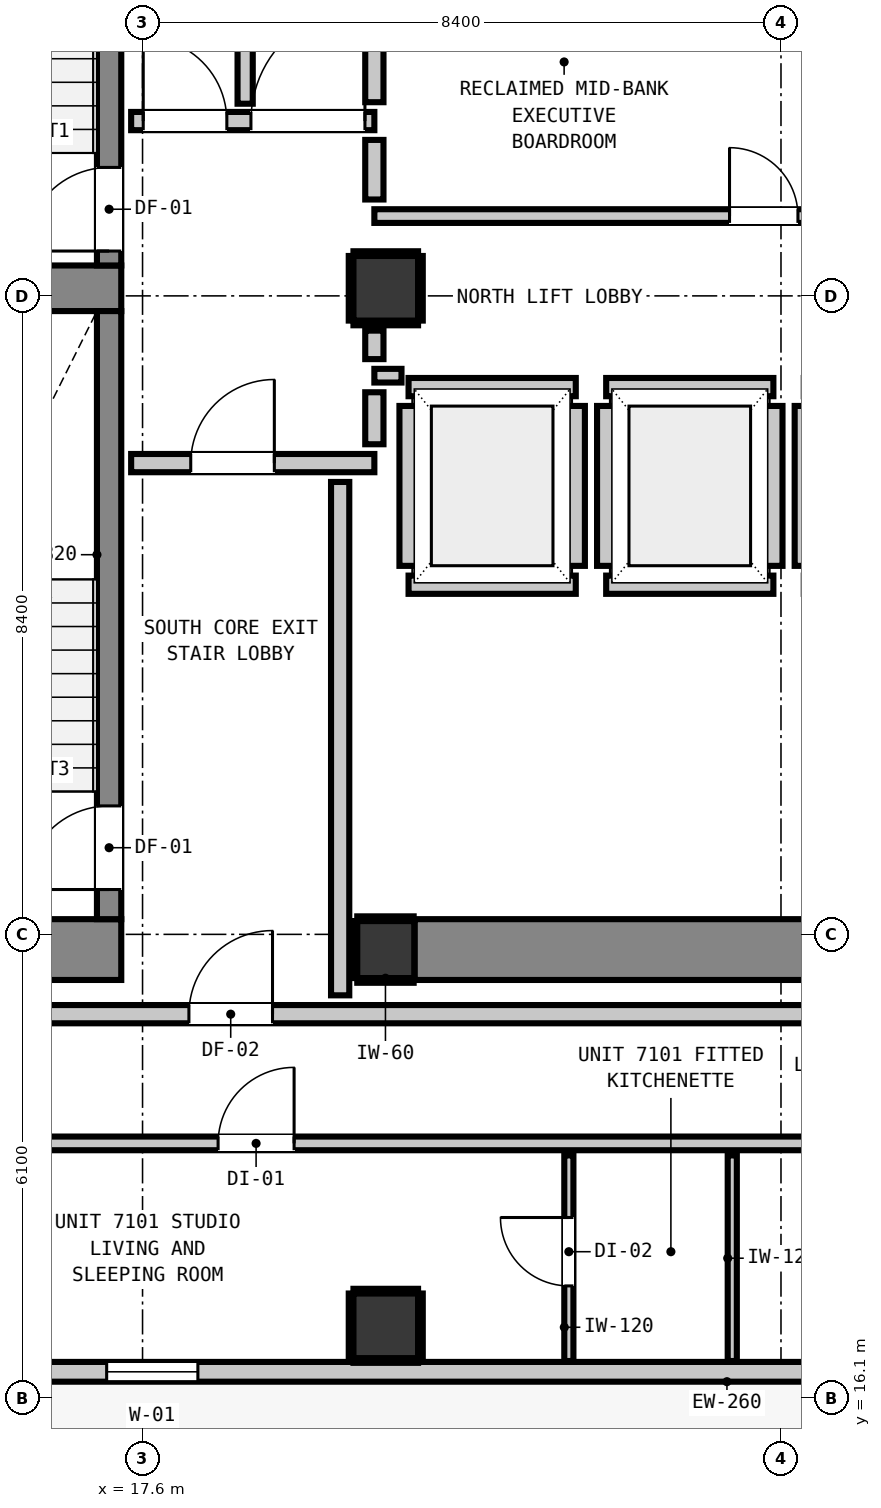
"""IFC4 building model, lengths in metres.
Left out: names, types, materials, properties, quantities, classifications, styles, units other than length and angle.
Written with IfcOpenShell. Run it as: python <this file> out.ifc"""

import sys

from ifc_helpers import new_model, si_unit, direction, frame, frame_2d, origin, origin_2d, place, context, subcontext, project, spatial, rectangle, extrude, element, fill, save


model = new_model("IFC4")
c1 = context("Model", 3, precision=1e-05, world=origin(), true_north=direction((0.0, 1.0)))
c2 = subcontext(c1, "Body", "Model", "MODEL_VIEW")
j1 = project(units=[si_unit("LENGTHUNIT", "METRE"), si_unit("PLANEANGLEUNIT", "RADIAN")], contexts=[c1])
p1 = place(None, origin())
s1 = spatial("IfcSite", under=j1, at=p1, CompositionType="ELEMENT")
p2 = place(p1, origin())
s2 = spatial("IfcBuilding", under=s1, at=p2, CompositionType="ELEMENT")
p3 = place(p2, frame((0.0, 0.0, 244.56)))
s3 = spatial("IfcBuildingStorey", under=s2, at=p3, CompositionType="ELEMENT", Elevation=244.56)
p4 = place(p3, frame((20.8, 22.0, 0.0), z_axis=(0.0, 0.0, 1.0), x_axis=(1.0, 0.0, 0.0)))
e1 = element("IfcColumn", 1, at=p4, inside=s3, PredefinedType="COLUMN", context=c2, shape_type="SweptSolid", body=[
    extrude(rectangle(XDim=0.75, YDim=0.75, at=origin_2d()), origin(), (0.0, 0.0, 1.0), 3.32),
])
p5 = place(p3, frame((13.24, 22.0, 0.0), z_axis=(0.0, 0.0, 1.0), x_axis=(1.0, 0.0, 0.0)))
e2 = element("IfcWall", 2, at=p5, inside=s3, PredefinedType="SHEAR", context=c2, shape_type="SweptSolid", body=[
    extrude(rectangle(XDim=4.08, YDim=0.8, at=frame_2d((2.04, 0.0))), origin(), (0.0, 0.0, 1.0), 3.32),
])
p6 = place(p3, frame((13.78, 30.7, 0.0), z_axis=(0.0, 0.0, 1.0), x_axis=(1.0, 0.0, 0.0)))
e3 = element("IfcWall", 3, at=p6, inside=s3, PredefinedType="SHEAR", context=c2, shape_type="SweptSolid", body=[
    extrude(rectangle(XDim=3.54, YDim=0.6, at=frame_2d((1.77, 0.0))), origin(), (0.0, 0.0, 1.0), 3.32),
])
p7 = place(p3, frame((21.18, 22.0, 0.0), z_axis=(0.0, 0.0, 1.0), x_axis=(1.0, 0.0, 0.0)))
e4 = element("IfcWall", 4, at=p7, inside=s3, PredefinedType="SHEAR", context=c2, shape_type="SweptSolid", body=[
    extrude(rectangle(XDim=7.64, YDim=0.8, at=frame_2d((3.82, 0.0))), origin(), (0.0, 0.0, 1.0), 3.32),
])
p8 = place(p3, frame((17.16, 31.0, 0.0), z_axis=(0.0, 0.0, 1.0), x_axis=(0.0, 1.0, 0.0)))
e5 = element("IfcWall", 5, at=p8, inside=s3, PredefinedType="SHEAR", context=c2, shape_type="SweptSolid", body=[
    extrude(rectangle(XDim=7.8, YDim=0.32, at=frame_2d((3.9, 0.0))), origin(), (0.0, 0.0, 1.0), 3.32),
])
p9 = place(p8, frame((0.19, 0.0, 0.0)))
e6 = element("IfcOpeningElement", 6, at=p9, cuts=e5, PredefinedType="OPENING", context=c2, shape_type="SweptSolid", body=[
    extrude(rectangle(XDim=1.1, YDim=2.15, at=frame_2d((0.55, 1.075))), frame((0.0, 0.17, 0.0), z_axis=(0.0, -1.0, 0.0), x_axis=(1.0, 0.0, 0.0)), (0.0, 0.0, 1.0), 0.34),
])
p10 = place(p3, frame((17.16, 22.4, 0.0), z_axis=(0.0, 0.0, 1.0), x_axis=(0.0, 1.0, 0.0)))
e7 = element("IfcWall", 7, at=p10, inside=s3, PredefinedType="SHEAR", context=c2, shape_type="SweptSolid", body=[
    extrude(rectangle(XDim=8.0, YDim=0.32, at=frame_2d((4.0, 0.0))), origin(), (0.0, 0.0, 1.0), 3.32),
])
p11 = place(p10, frame((0.39, 0.0, 0.0)))
e8 = element("IfcOpeningElement", 8, at=p11, cuts=e7, PredefinedType="OPENING", context=c2, shape_type="SweptSolid", body=[
    extrude(rectangle(XDim=1.1, YDim=2.15, at=frame_2d((0.55, 1.075))), frame((0.0, 0.17, 0.0), z_axis=(0.0, -1.0, 0.0), x_axis=(1.0, 0.0, 0.0)), (0.0, 0.0, 1.0), 0.34),
])
for number, where, z_axis, x_axis in (
    (9, (20.8, 30.7, 0.0), (0.0, 0.0, 1.0), (1.0, 0.0, 0.0)),
    (10, (20.8, 17.05, 0.0), (0.0, 0.0, 1.0), (1.0, 0.0, 0.0)),
):
    element("IfcColumn", number, at=place(p3, frame(where, z_axis=z_axis, x_axis=x_axis)), inside=s3, PredefinedType="COLUMN", context=c2, shape_type="SweptSolid", body=[
        extrude(rectangle(XDim=0.85, YDim=0.85, at=origin_2d()), origin(), (0.0, 0.0, 1.0), 3.32),
    ])
p12 = place(p3, frame((45.455, 16.445, 0.0), z_axis=(0.0, 0.0, 1.0), x_axis=(-1.0, 0.0, 0.0)))
e11 = element("IfcWall", 11, at=p12, inside=s3, PredefinedType="STANDARD", context=c2, shape_type="SweptSolid", body=[
    extrude(rectangle(XDim=32.71, YDim=0.26, at=frame_2d((16.355, 0.0))), origin(), (0.0, 0.0, 1.0), 3.1),
])
p13 = place(p12, frame((0.907, 0.0, 0.0)))
e12 = element("IfcOpeningElement", 12, at=p13, cuts=e11, PredefinedType="OPENING", context=c2, shape_type="SweptSolid", body=[
    extrude(rectangle(XDim=1.0, YDim=2.15, at=frame_2d((0.5, 1.075))), frame((0.0, 0.14, 0.0), z_axis=(0.0, -1.0, 0.0), x_axis=(1.0, 0.0, 0.0)), (0.0, 0.0, 1.0), 0.28),
])
p14 = place(p12, frame((27.127, 0.0, 0.85)))
e13 = element("IfcOpeningElement", 13, at=p14, cuts=e11, PredefinedType="OPENING", context=c2, shape_type="SweptSolid", body=[
    extrude(rectangle(XDim=1.2, YDim=1.8, at=frame_2d((0.6, 0.9))), frame((0.0, 0.14, 0.0), z_axis=(0.0, -1.0, 0.0), x_axis=(1.0, 0.0, 0.0)), (0.0, 0.0, 1.0), 0.28),
])
p15 = place(p12, frame((12.005, 0.0, 0.85)))
e14 = element("IfcOpeningElement", 14, at=p15, cuts=e11, PredefinedType="OPENING", context=c2, shape_type="SweptSolid", body=[
    extrude(rectangle(XDim=1.2, YDim=1.8, at=frame_2d((0.6, 0.9))), frame((0.0, 0.14, 0.0), z_axis=(0.0, -1.0, 0.0), x_axis=(1.0, 0.0, 0.0)), (0.0, 0.0, 1.0), 0.28),
])
for number, where, z_axis, x_axis in (
    (15, (21.1, 26.8, 0.0), (0.0, 0.0, 1.0), (1.0, 0.0, 0.0)),
    (16, (21.1, 29.4, 0.0), (0.0, 0.0, 1.0), (1.0, 0.0, 0.0)),
):
    element("IfcWall", number, at=place(p3, frame(where, z_axis=z_axis, x_axis=x_axis)), inside=s3, PredefinedType="PARTITIONING", context=c2, shape_type="SweptSolid", body=[
        extrude(rectangle(XDim=2.2, YDim=0.24, at=frame_2d((1.1, 0.0))), origin(), (0.0, 0.0, 1.0), 3.1),
    ])
p16 = place(p3, frame((21.1, 27.048, 0.0), z_axis=(0.0, 0.0, 1.0), x_axis=(0.0, 1.0, 0.0)))
e17 = element("IfcWall", 17, at=p16, inside=s3, PredefinedType="PARTITIONING", context=c2, shape_type="SweptSolid", body=[
    extrude(rectangle(XDim=2.104, YDim=0.24, at=frame_2d((1.052, 0.0))), origin(), (0.0, 0.0, 1.0), 2.335),
])
p17 = place(p3, frame((23.3, 27.048, 0.0), z_axis=(0.0, 0.0, 1.0), x_axis=(0.0, 1.0, 0.0)))
e18 = element("IfcWall", 18, at=p17, inside=s3, PredefinedType="PARTITIONING", context=c2, shape_type="SweptSolid", body=[
    extrude(rectangle(XDim=2.104, YDim=0.24, at=frame_2d((1.052, 0.0))), origin(), (0.0, 0.0, 1.0), 3.1),
])
for number, where, z_axis, x_axis in (
    (19, (23.7, 26.8, 0.0), (0.0, 0.0, 1.0), (1.0, 0.0, 0.0)),
    (20, (23.7, 29.4, 0.0), (0.0, 0.0, 1.0), (1.0, 0.0, 0.0)),
):
    element("IfcWall", number, at=place(p3, frame(where, z_axis=z_axis, x_axis=x_axis)), inside=s3, PredefinedType="PARTITIONING", context=c2, shape_type="SweptSolid", body=[
        extrude(rectangle(XDim=2.2, YDim=0.24, at=frame_2d((1.1, 0.0))), origin(), (0.0, 0.0, 1.0), 3.1),
    ])
for number, where, z_axis, x_axis in (
    (21, (23.7, 27.048, 0.0), (0.0, 0.0, 1.0), (0.0, 1.0, 0.0)),
    (22, (25.9, 27.048, 0.0), (0.0, 0.0, 1.0), (0.0, 1.0, 0.0)),
    (23, (26.3, 27.048, 0.0), (0.0, 0.0, 1.0), (0.0, 1.0, 0.0)),
):
    element("IfcWall", number, at=place(p3, frame(where, z_axis=z_axis, x_axis=x_axis)), inside=s3, PredefinedType="PARTITIONING", context=c2, shape_type="SweptSolid", body=[
        extrude(rectangle(XDim=2.104, YDim=0.24, at=frame_2d((1.052, 0.0))), origin(), (0.0, 0.0, 1.0), 3.1),
    ])
p18 = place(p3, frame((10.787, 21.15, 0.0), z_axis=(0.0, 0.0, 1.0), x_axis=(1.0, 0.0, 0.0)))
e24 = element("IfcWall", 24, at=p18, inside=s3, PredefinedType="PARTITIONING", context=c2, shape_type="SweptSolid", body=[
    extrude(rectangle(XDim=26.102, YDim=0.24, at=frame_2d((13.051, 0.0))), origin(), (0.0, 0.0, 1.0), 3.1),
])
p19 = place(p18, frame((7.423, 0.0, 0.0)))
e25 = element("IfcOpeningElement", 25, at=p19, cuts=e24, PredefinedType="OPENING", context=c2, shape_type="SweptSolid", body=[
    extrude(rectangle(XDim=1.1, YDim=2.15, at=frame_2d((0.55, 1.075))), frame((0.0, 0.13, 0.0), z_axis=(0.0, -1.0, 0.0), x_axis=(1.0, 0.0, 0.0)), (0.0, 0.0, 1.0), 0.26),
])
p20 = place(p3, frame((17.45, 28.4, 0.0), z_axis=(0.0, 0.0, 1.0), x_axis=(1.0, 0.0, 0.0)))
e26 = element("IfcWall", 26, at=p20, inside=s3, PredefinedType="PARTITIONING", context=c2, shape_type="SweptSolid", body=[
    extrude(rectangle(XDim=3.2, YDim=0.24, at=frame_2d((1.6, 0.0))), origin(), (0.0, 0.0, 1.0), 3.1),
])
p21 = place(p20, frame((0.784, 0.0, 0.0)))
e27 = element("IfcOpeningElement", 27, at=p21, cuts=e26, PredefinedType="OPENING", context=c2, shape_type="SweptSolid", body=[
    extrude(rectangle(XDim=1.1, YDim=2.15, at=frame_2d((0.55, 1.075))), frame((0.0, 0.13, 0.0), z_axis=(0.0, -1.0, 0.0), x_axis=(1.0, 0.0, 0.0)), (0.0, 0.0, 1.0), 0.26),
])
p22 = place(p3, frame((17.45, 32.9, 0.0), z_axis=(0.0, 0.0, 1.0), x_axis=(1.0, 0.0, 0.0)))
e28 = element("IfcWall", 28, at=p22, inside=s3, PredefinedType="PARTITIONING", context=c2, shape_type="SweptSolid", body=[
    extrude(rectangle(XDim=3.2, YDim=0.24, at=frame_2d((1.6, 0.0))), origin(), (0.0, 0.0, 1.0), 3.1),
])
p23 = place(p22, frame((0.159, 0.0, 0.0)))
e29 = element("IfcOpeningElement", 29, at=p23, cuts=e28, PredefinedType="OPENING", context=c2, shape_type="SweptSolid", body=[
    extrude(rectangle(XDim=1.1, YDim=2.15, at=frame_2d((0.55, 1.075))), frame((0.0, 0.13, 0.0), z_axis=(0.0, -1.0, 0.0), x_axis=(1.0, 0.0, 0.0)), (0.0, 0.0, 1.0), 0.26),
])
p24 = place(p22, frame((1.576, 0.0, 0.0)))
e30 = element("IfcOpeningElement", 30, at=p24, cuts=e28, PredefinedType="OPENING", context=c2, shape_type="SweptSolid", body=[
    extrude(rectangle(XDim=1.5, YDim=2.15, at=frame_2d((0.75, 1.075))), frame((0.0, 0.13, 0.0), z_axis=(0.0, -1.0, 0.0), x_axis=(1.0, 0.0, 0.0)), (0.0, 0.0, 1.0), 0.26),
])
p25 = place(p3, frame((10.787, 19.45, 0.0), z_axis=(0.0, 0.0, 1.0), x_axis=(1.0, 0.0, 0.0)))
e31 = element("IfcWall", 31, at=p25, inside=s3, PredefinedType="PARTITIONING", context=c2, shape_type="SweptSolid", body=[
    extrude(rectangle(XDim=26.102, YDim=0.18, at=frame_2d((13.051, 0.0))), origin(), (0.0, 0.0, 1.0), 3.1),
])
p26 = place(p25, frame((7.807, 0.0, 0.0)))
e32 = element("IfcOpeningElement", 32, at=p26, cuts=e31, PredefinedType="OPENING", context=c2, shape_type="SweptSolid", body=[
    extrude(rectangle(XDim=1.0, YDim=2.15, at=frame_2d((0.5, 1.075))), frame((0.0, 0.1, 0.0), z_axis=(0.0, -1.0, 0.0), x_axis=(1.0, 0.0, 0.0)), (0.0, 0.0, 1.0), 0.2),
])
p27 = place(p25, frame((25.092, 0.0, 0.0)))
e33 = element("IfcOpeningElement", 33, at=p27, cuts=e31, PredefinedType="OPENING", context=c2, shape_type="SweptSolid", body=[
    extrude(rectangle(XDim=0.9, YDim=2.1, at=frame_2d((0.45, 1.05))), frame((0.0, 0.1, 0.0), z_axis=(0.0, -1.0, 0.0), x_axis=(1.0, 0.0, 0.0)), (0.0, 0.0, 1.0), 0.2),
])
p28 = place(p3, frame((20.65, 29.55, 0.0), z_axis=(0.0, 0.0, 1.0), x_axis=(1.0, 0.0, 0.0)))
e34 = element("IfcWall", 34, at=p28, inside=s3, PredefinedType="PARTITIONING", context=c2, shape_type="SweptSolid", body=[
    extrude(rectangle(XDim=0.357, YDim=0.18, at=frame_2d((0.179, 0.0))), origin(), (0.0, 0.0, 1.0), 3.1),
])
p29 = place(p3, frame((20.65, 31.65, 0.0), z_axis=(0.0, 0.0, 1.0), x_axis=(1.0, 0.0, 0.0)))
e35 = element("IfcWall", 35, at=p29, inside=s3, PredefinedType="PARTITIONING", context=c2, shape_type="SweptSolid", body=[
    extrude(rectangle(XDim=7.7, YDim=0.18, at=frame_2d((3.85, 0.0))), origin(), (0.0, 0.0, 1.0), 3.1),
])
p30 = place(p29, frame((4.673, 0.0, 0.0)))
e36 = element("IfcOpeningElement", 36, at=p30, cuts=e35, PredefinedType="OPENING", context=c2, shape_type="SweptSolid", body=[
    extrude(rectangle(XDim=0.9, YDim=2.1, at=frame_2d((0.45, 1.05))), frame((0.0, 0.1, 0.0), z_axis=(0.0, -1.0, 0.0), x_axis=(1.0, 0.0, 0.0)), (0.0, 0.0, 1.0), 0.2),
])
p31 = place(p3, frame((20.2, 21.398, 0.0), z_axis=(0.0, 0.0, 1.0), x_axis=(0.0, 1.0, 0.0)))
e37 = element("IfcWall", 37, at=p31, inside=s3, PredefinedType="PARTITIONING", context=c2, shape_type="SweptSolid", body=[
    extrude(rectangle(XDim=6.754, YDim=0.24, at=frame_2d((3.377, 0.0))), origin(), (0.0, 0.0, 1.0), 3.1),
])
p32 = place(p3, frame((20.65, 28.648, 0.0), z_axis=(0.0, 0.0, 1.0), x_axis=(0.0, 1.0, 0.0)))
e38 = element("IfcWall", 38, at=p32, inside=s3, PredefinedType="PARTITIONING", context=c2, shape_type="SweptSolid", body=[
    extrude(rectangle(XDim=0.684, YDim=0.24, at=frame_2d((0.342, 0.0))), origin(), (0.0, 0.0, 1.0), 2.335),
])
p33 = place(p3, frame((20.65, 29.768, 0.0), z_axis=(0.0, 0.0, 1.0), x_axis=(0.0, 1.0, 0.0)))
e39 = element("IfcWall", 39, at=p33, inside=s3, PredefinedType="PARTITIONING", context=c2, shape_type="SweptSolid", body=[
    extrude(rectangle(XDim=0.375, YDim=0.24, at=frame_2d((0.188, 0.0))), origin(), (0.0, 0.0, 1.0), 2.335),
])
p34 = place(p3, frame((20.65, 31.868, 0.0), z_axis=(0.0, 0.0, 1.0), x_axis=(0.0, 1.0, 0.0)))
e40 = element("IfcWall", 40, at=p34, inside=s3, PredefinedType="PARTITIONING", context=c2, shape_type="SweptSolid", body=[
    extrude(rectangle(XDim=0.784, YDim=0.24, at=frame_2d((0.392, 0.0))), origin(), (0.0, 0.0, 1.0), 2.335),
])
p35 = place(p3, frame((20.65, 33.148, 0.0), z_axis=(0.0, 0.0, 1.0), x_axis=(0.0, 1.0, 0.0)))
e41 = element("IfcWall", 41, at=p35, inside=s3, PredefinedType="PARTITIONING", context=c2, shape_type="SweptSolid", body=[
    extrude(rectangle(XDim=2.274, YDim=0.24, at=frame_2d((1.137, 0.0))), origin(), (0.0, 0.0, 1.0), 2.335),
])
p36 = place(p3, frame((18.95, 33.128, 0.0), z_axis=(0.0, 0.0, 1.0), x_axis=(0.0, 1.0, 0.0)))
e42 = element("IfcWall", 42, at=p36, inside=s3, PredefinedType="PARTITIONING", context=c2, shape_type="SweptSolid", body=[
    extrude(rectangle(XDim=2.314, YDim=0.2, at=frame_2d((1.157, 0.0))), origin(), (0.0, 0.0, 1.0), 3.1),
])
p37 = place(p3, frame((23.209, 16.587, 0.0), z_axis=(0.0, 0.0, 1.0), x_axis=(0.0, 1.0, 0.0)))
e43 = element("IfcWall", 43, at=p37, inside=s3, PredefinedType="PARTITIONING", context=c2, shape_type="SweptSolid", body=[
    extrude(rectangle(XDim=2.705, YDim=0.12, at=frame_2d((1.353, 0.0))), origin(), (0.0, 0.0, 1.0), 3.1),
])
p38 = place(p37, frame((0.988, 0.0, 0.0)))
e44 = element("IfcOpeningElement", 44, at=p38, cuts=e43, PredefinedType="OPENING", context=c2, shape_type="SweptSolid", body=[
    extrude(rectangle(XDim=0.9, YDim=2.1, at=frame_2d((0.45, 1.05))), frame((0.0, 0.07, 0.0), z_axis=(0.0, -1.0, 0.0), x_axis=(1.0, 0.0, 0.0)), (0.0, 0.0, 1.0), 0.14),
])
p39 = place(p3, frame((25.359, 16.587, 0.0), z_axis=(0.0, 0.0, 1.0), x_axis=(0.0, 1.0, 0.0)))
e45 = element("IfcWall", 45, at=p39, inside=s3, PredefinedType="PARTITIONING", context=c2, shape_type="SweptSolid", body=[
    extrude(rectangle(XDim=2.705, YDim=0.12, at=frame_2d((1.353, 0.0))), origin(), (0.0, 0.0, 1.0), 3.1),
])
for number, where, z_axis, x_axis in (
    (46, (20.425, 21.593, 0.0), (0.0, 0.0, 1.0), (1.0, 0.0, 0.0)),
    (47, (20.425, 22.407, 0.0), (0.0, 0.0, 1.0), (1.0, 0.0, 0.0)),
):
    element("IfcWall", number, at=place(p3, frame(where, z_axis=z_axis, x_axis=x_axis)), inside=s3, PredefinedType="PARTITIONING", context=c2, shape_type="SweptSolid", body=[
        extrude(rectangle(XDim=0.742, YDim=0.06, at=frame_2d((0.371, 0.0))), origin(), (0.0, 0.0, 1.0), 1.45),
    ])
p40 = place(p3, frame((20.393, 21.625, 0.0), z_axis=(0.0, 0.0, 1.0), x_axis=(0.0, 1.0, 0.0)))
e48 = element("IfcWall", 48, at=p40, inside=s3, PredefinedType="PARTITIONING", context=c2, shape_type="SweptSolid", body=[
    extrude(rectangle(XDim=0.75, YDim=0.06, at=frame_2d((0.375, 0.0))), origin(), (0.0, 0.0, 1.0), 1.45),
])
for number, where, z_axis, x_axis in (
    (49, (20.375, 30.243, 0.0), (0.0, 0.0, 1.0), (1.0, 0.0, 0.0)),
    (50, (20.375, 31.157, 0.0), (0.0, 0.0, 1.0), (1.0, 0.0, 0.0)),
    (51, (20.343, 30.275, 0.0), (0.0, 0.0, 1.0), (0.0, 1.0, 0.0)),
    (52, (21.257, 30.275, 0.0), (0.0, 0.0, 1.0), (0.0, 1.0, 0.0)),
    (53, (20.375, 16.593, 0.0), (0.0, 0.0, 1.0), (1.0, 0.0, 0.0)),
    (54, (20.375, 17.507, 0.0), (0.0, 0.0, 1.0), (1.0, 0.0, 0.0)),
    (55, (20.343, 16.625, 0.0), (0.0, 0.0, 1.0), (0.0, 1.0, 0.0)),
    (56, (21.257, 16.625, 0.0), (0.0, 0.0, 1.0), (0.0, 1.0, 0.0)),
):
    element("IfcWall", number, at=place(p3, frame(where, z_axis=z_axis, x_axis=x_axis)), inside=s3, PredefinedType="PARTITIONING", context=c2, shape_type="SweptSolid", body=[
        extrude(rectangle(XDim=0.85, YDim=0.06, at=frame_2d((0.425, 0.0))), origin(), (0.0, 0.0, 1.0), 1.45),
    ])
p41 = place(p14, origin())
e57 = element("IfcWindow", 57, at=p41, inside=s3, PartitioningType="SINGLE_PANEL", PredefinedType="WINDOW", context=c2, shape_type="SweptSolid", body=[
    extrude(rectangle(XDim=1.2, YDim=1.8, at=frame_2d((0.6, 0.9))), frame((0.0, 0.03, 0.0), z_axis=(0.0, -1.0, 0.0), x_axis=(1.0, 0.0, 0.0)), (0.0, 0.0, 1.0), 0.06),
])
fill(e13, e57)
p42 = place(p9, origin())
e58 = element("IfcDoor", 58, at=p42, inside=s3, OperationType="SINGLE_SWING_LEFT", PredefinedType="DOOR", context=c2, shape_type="SweptSolid", body=[
    extrude(rectangle(XDim=1.1, YDim=2.15, at=frame_2d((0.55, 1.075))), frame((0.0, 0.025, 0.0), z_axis=(0.0, -1.0, 0.0), x_axis=(1.0, 0.0, 0.0)), (0.0, 0.0, 1.0), 0.05),
])
fill(e6, e58)
p43 = place(p11, origin())
e59 = element("IfcDoor", 59, at=p43, inside=s3, OperationType="SINGLE_SWING_LEFT", PredefinedType="DOOR", context=c2, shape_type="SweptSolid", body=[
    extrude(rectangle(XDim=1.1, YDim=2.15, at=frame_2d((0.55, 1.075))), frame((0.0, 0.025, 0.0), z_axis=(0.0, -1.0, 0.0), x_axis=(1.0, 0.0, 0.0)), (0.0, 0.0, 1.0), 0.05),
])
fill(e8, e59)
p44 = place(p21, origin())
e60 = element("IfcDoor", 60, at=p44, inside=s3, OperationType="SINGLE_SWING_RIGHT", PredefinedType="DOOR", context=c2, shape_type="SweptSolid", body=[
    extrude(rectangle(XDim=1.1, YDim=2.15, at=frame_2d((0.55, 1.075))), frame((0.0, 0.025, 0.0), z_axis=(0.0, -1.0, 0.0), x_axis=(1.0, 0.0, 0.0)), (0.0, 0.0, 1.0), 0.05),
])
fill(e27, e60)
p45 = place(p23, origin())
e61 = element("IfcDoor", 61, at=p45, inside=s3, OperationType="SINGLE_SWING_LEFT", PredefinedType="DOOR", context=c2, shape_type="SweptSolid", body=[
    extrude(rectangle(XDim=1.1, YDim=2.15, at=frame_2d((0.55, 1.075))), frame((0.0, 0.025, 0.0), z_axis=(0.0, -1.0, 0.0), x_axis=(1.0, 0.0, 0.0)), (0.0, 0.0, 1.0), 0.05),
])
fill(e29, e61)
p46 = place(p19, origin())
e62 = element("IfcDoor", 62, at=p46, inside=s3, OperationType="SINGLE_SWING_RIGHT", PredefinedType="DOOR", context=c2, shape_type="SweptSolid", body=[
    extrude(rectangle(XDim=1.1, YDim=2.15, at=frame_2d((0.55, 1.075))), frame((0.0, 0.025, 0.0), z_axis=(0.0, -1.0, 0.0), x_axis=(1.0, 0.0, 0.0)), (0.0, 0.0, 1.0), 0.05),
])
fill(e25, e62)
p47 = place(p24, origin())
e63 = element("IfcDoor", 63, at=p47, inside=s3, OperationType="SINGLE_SWING_RIGHT", PredefinedType="DOOR", context=c2, shape_type="SweptSolid", body=[
    extrude(rectangle(XDim=1.5, YDim=2.15, at=frame_2d((0.75, 1.075))), frame((0.0, 0.025, 0.0), z_axis=(0.0, -1.0, 0.0), x_axis=(1.0, 0.0, 0.0)), (0.0, 0.0, 1.0), 0.05),
])
fill(e30, e63)
p48 = place(p30, origin())
e64 = element("IfcDoor", 64, at=p48, inside=s3, OperationType="SINGLE_SWING_LEFT", PredefinedType="DOOR", context=c2, shape_type="SweptSolid", body=[
    extrude(rectangle(XDim=0.9, YDim=2.1, at=frame_2d((0.45, 1.05))), frame((0.0, 0.025, 0.0), z_axis=(0.0, -1.0, 0.0), x_axis=(1.0, 0.0, 0.0)), (0.0, 0.0, 1.0), 0.05),
])
fill(e36, e64)
p49 = place(p26, origin())
e65 = element("IfcDoor", 65, at=p49, inside=s3, OperationType="SINGLE_SWING_RIGHT", PredefinedType="DOOR", context=c2, shape_type="SweptSolid", body=[
    extrude(rectangle(XDim=1.0, YDim=2.15, at=frame_2d((0.5, 1.075))), frame((0.0, 0.025, 0.0), z_axis=(0.0, -1.0, 0.0), x_axis=(1.0, 0.0, 0.0)), (0.0, 0.0, 1.0), 0.05),
])
fill(e32, e65)
p50 = place(p38, origin())
e66 = element("IfcDoor", 66, at=p50, inside=s3, OperationType="SINGLE_SWING_RIGHT", PredefinedType="DOOR", context=c2, shape_type="SweptSolid", body=[
    extrude(rectangle(XDim=0.9, YDim=2.1, at=frame_2d((0.45, 1.05))), frame((0.0, 0.025, 0.0), z_axis=(0.0, -1.0, 0.0), x_axis=(1.0, 0.0, 0.0)), (0.0, 0.0, 1.0), 0.05),
])
fill(e44, e66)
save(model, sys.argv[1])
